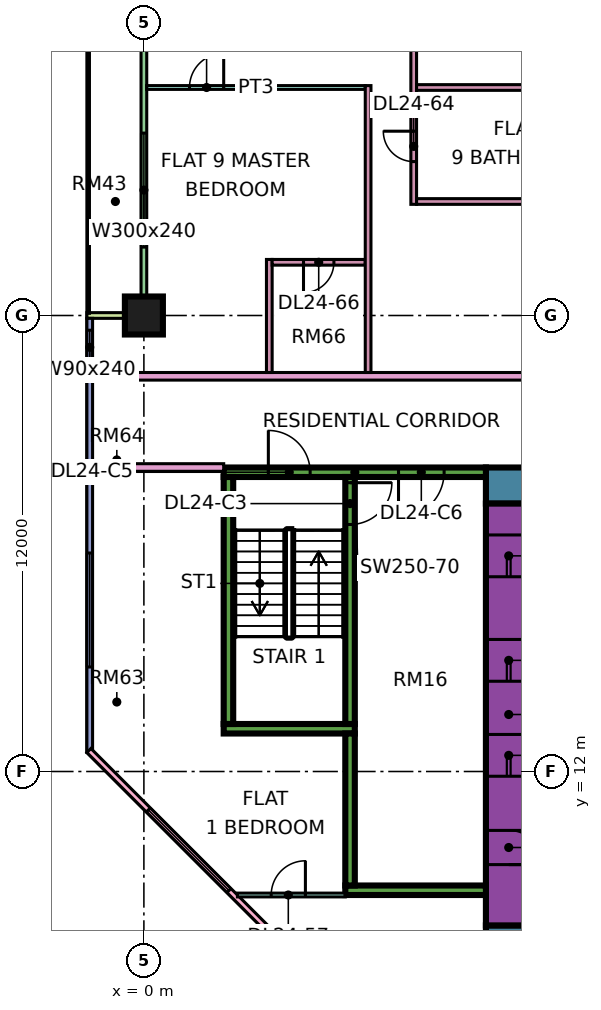
"""IFC4 building model, lengths in metres.
Left out: names, types, materials, properties, quantities, classifications, styles, units other than length and angle.
Written with IfcOpenShell. Run it as: python <this file> out.ifc"""

import sys

from ifc_helpers import new_model, si_unit, direction, frame, frame_2d, origin, origin_2d, place, context, subcontext, project, spatial, rectangle, extrude, element, fill, save


model = new_model("IFC4")
c1 = context("Model", 3, precision=1e-05, world=origin(), true_north=direction((0.0, 1.0)))
c2 = subcontext(c1, "Body", "Model", "MODEL_VIEW")
j1 = project(units=[si_unit("LENGTHUNIT", "METRE"), si_unit("PLANEANGLEUNIT", "RADIAN")], contexts=[c1])
p1 = place(None, origin())
s1 = spatial("IfcSite", under=j1, at=p1, CompositionType="ELEMENT")
p2 = place(p1, origin())
s2 = spatial("IfcBuilding", under=s1, at=p2, CompositionType="ELEMENT")
p3 = place(p2, frame((0.0, 0.0, 106.9)))
s3 = spatial("IfcBuildingStorey", under=s2, at=p3, CompositionType="ELEMENT", Elevation=106.9)
p4 = place(p3, frame((0.0, 24.0, 0.0), z_axis=(0.0, 0.0, 1.0), x_axis=(1.0, 0.0, 0.0)))
e1 = element("IfcColumn", 1, at=p4, inside=s3, PredefinedType="COLUMN", context=c2, shape_type="SweptSolid", body=[
    extrude(rectangle(XDim=1.0, YDim=1.0, at=origin_2d()), origin(), (0.0, 0.0, 1.0), 3.75),
])
p5 = place(p3, frame((9.0, 7.475, 0.0), z_axis=(0.0, 0.0, 1.0), x_axis=(1.0, 0.0, 0.0)))
e2 = element("IfcWall", 2, at=p5, inside=s3, PredefinedType="SHEAR", context=c2, shape_type="SweptSolid", body=[
    extrude(rectangle(XDim=25.0, YDim=0.95, at=frame_2d((12.5, 0.0))), origin(), (0.0, 0.0, 1.0), 3.75),
])
p6 = place(p3, frame((9.0, 19.525, 0.0), z_axis=(0.0, 0.0, 1.0), x_axis=(1.0, 0.0, 0.0)))
e3 = element("IfcWall", 3, at=p6, inside=s3, PredefinedType="SHEAR", context=c2, shape_type="SweptSolid", body=[
    extrude(rectangle(XDim=25.0, YDim=0.95, at=frame_2d((12.5, 0.0))), origin(), (0.0, 0.0, 1.0), 3.75),
])
p7 = place(p6, frame((19.1, 0.0, 0.0)))
e4 = element("IfcOpeningElement", 4, at=p7, cuts=e3, PredefinedType="OPENING", context=c2, shape_type="SweptSolid", body=[
    extrude(rectangle(XDim=1.8, YDim=2.4, at=frame_2d((0.9, 1.2))), frame((0.0, 0.485, 0.0), z_axis=(0.0, -1.0, 0.0), x_axis=(1.0, 0.0, 0.0)), (0.0, 0.0, 1.0), 0.97),
])
p8 = place(p3, frame((9.6, 7.95, 0.0), z_axis=(0.0, 0.0, 1.0), x_axis=(0.0, 1.0, 0.0)))
e5 = element("IfcWall", 5, at=p8, inside=s3, PredefinedType="SHEAR", context=c2, shape_type="SweptSolid", body=[
    extrude(rectangle(XDim=11.1, YDim=1.2, at=frame_2d((5.55, 0.0))), origin(), (0.0, 0.0, 1.0), 3.75),
])
p9 = place(p8, frame((3.925, 0.0, 0.0)))
e6 = element("IfcOpeningElement", 6, at=p9, cuts=e5, PredefinedType="OPENING", context=c2, shape_type="SweptSolid", body=[
    extrude(rectangle(XDim=1.1, YDim=2.2, at=frame_2d((0.55, 1.1))), frame((0.0, 0.61, 0.0), z_axis=(0.0, -1.0, 0.0), x_axis=(1.0, 0.0, 0.0)), (0.0, 0.0, 1.0), 1.22),
])
p10 = place(p8, frame((6.425, 0.0, 0.0)))
e7 = element("IfcOpeningElement", 7, at=p10, cuts=e5, PredefinedType="OPENING", context=c2, shape_type="SweptSolid", body=[
    extrude(rectangle(XDim=1.1, YDim=2.2, at=frame_2d((0.55, 1.1))), frame((0.0, 0.61, 0.0), z_axis=(0.0, -1.0, 0.0), x_axis=(1.0, 0.0, 0.0)), (0.0, 0.0, 1.0), 1.22),
])
p11 = place(p8, frame((9.175, 0.0, 0.0)))
e8 = element("IfcOpeningElement", 8, at=p11, cuts=e5, PredefinedType="OPENING", context=c2, shape_type="SweptSolid", body=[
    extrude(rectangle(XDim=1.1, YDim=2.2, at=frame_2d((0.55, 1.1))), frame((0.0, 0.61, 0.0), z_axis=(0.0, -1.0, 0.0), x_axis=(1.0, 0.0, 0.0)), (0.0, 0.0, 1.0), 1.22),
])
p12 = place(p8, frame((1.6, 0.0, 0.0)))
e9 = element("IfcOpeningElement", 9, at=p12, cuts=e5, PredefinedType="OPENING", context=c2, shape_type="SweptSolid", body=[
    extrude(rectangle(XDim=0.9, YDim=2.1, at=frame_2d((0.45, 1.05))), frame((0.0, 0.61, 0.0), z_axis=(0.0, -1.0, 0.0), x_axis=(1.0, 0.0, 0.0)), (0.0, 0.0, 1.0), 1.22),
])
p13 = place(p3, frame((2.1, 19.875, 0.0), z_axis=(0.0, 0.0, 1.0), x_axis=(1.0, 0.0, 0.0)))
e10 = element("IfcWall", 10, at=p13, inside=s3, PredefinedType="SHEAR", context=c2, shape_type="SweptSolid", body=[
    extrude(rectangle(XDim=6.9, YDim=0.25, at=frame_2d((3.45, 0.0))), origin(), (0.0, 0.0, 1.0), 3.75),
])
p14 = place(p13, frame((1.175, 0.0, 0.0)))
e11 = element("IfcOpeningElement", 11, at=p14, cuts=e10, PredefinedType="OPENING", context=c2, shape_type="SweptSolid", body=[
    extrude(rectangle(XDim=1.1, YDim=2.2, at=frame_2d((0.55, 1.1))), frame((0.0, 0.135, 0.0), z_axis=(0.0, -1.0, 0.0), x_axis=(1.0, 0.0, 0.0)), (0.0, 0.0, 1.0), 0.27),
])
p15 = place(p13, frame((4.6, 0.0, 0.0)))
e12 = element("IfcOpeningElement", 12, at=p15, cuts=e10, PredefinedType="OPENING", context=c2, shape_type="SweptSolid", body=[
    extrude(rectangle(XDim=1.2, YDim=2.2, at=frame_2d((0.6, 1.1))), frame((0.0, 0.135, 0.0), z_axis=(0.0, -1.0, 0.0), x_axis=(1.0, 0.0, 0.0)), (0.0, 0.0, 1.0), 0.27),
])
p16 = place(p3, frame((2.1, 13.125, 0.0), z_axis=(0.0, 0.0, 1.0), x_axis=(1.0, 0.0, 0.0)))
e13 = element("IfcWall", 13, at=p16, inside=s3, PredefinedType="SHEAR", context=c2, shape_type="SweptSolid", body=[
    extrude(rectangle(XDim=3.45, YDim=0.25, at=frame_2d((1.725, 0.0))), origin(), (0.0, 0.0, 1.0), 3.75),
])
p17 = place(p3, frame((2.225, 13.25, 0.0), z_axis=(0.0, 0.0, 1.0), x_axis=(0.0, 1.0, 0.0)))
e14 = element("IfcWall", 14, at=p17, inside=s3, PredefinedType="SHEAR", context=c2, shape_type="SweptSolid", body=[
    extrude(rectangle(XDim=6.5, YDim=0.25, at=frame_2d((3.25, 0.0))), origin(), (0.0, 0.0, 1.0), 3.75),
])
p18 = place(p3, frame((5.425, 13.25, 0.0), z_axis=(0.0, 0.0, 1.0), x_axis=(0.0, 1.0, 0.0)))
e15 = element("IfcWall", 15, at=p18, inside=s3, PredefinedType="SHEAR", context=c2, shape_type="SweptSolid", body=[
    extrude(rectangle(XDim=6.5, YDim=0.25, at=frame_2d((3.25, 0.0))), origin(), (0.0, 0.0, 1.0), 3.75),
])
p19 = place(p18, frame((5.25, 0.0, 0.0)))
e16 = element("IfcOpeningElement", 16, at=p19, cuts=e15, PredefinedType="OPENING", context=c2, shape_type="SweptSolid", body=[
    extrude(rectangle(XDim=1.1, YDim=2.2, at=frame_2d((0.55, 1.1))), frame((0.0, 0.135, 0.0), z_axis=(0.0, -1.0, 0.0), x_axis=(1.0, 0.0, 0.0)), (0.0, 0.0, 1.0), 0.27),
])
p20 = place(p3, frame((5.3, 8.875, 0.0), z_axis=(0.0, 0.0, 1.0), x_axis=(1.0, 0.0, 0.0)))
e17 = element("IfcWall", 17, at=p20, inside=s3, PredefinedType="SHEAR", context=c2, shape_type="SweptSolid", body=[
    extrude(rectangle(XDim=3.7, YDim=0.25, at=frame_2d((1.85, 0.0))), origin(), (0.0, 0.0, 1.0), 3.75),
])
p21 = place(p3, frame((5.425, 9.0, 0.0), z_axis=(0.0, 0.0, 1.0), x_axis=(0.0, 1.0, 0.0)))
e18 = element("IfcWall", 18, at=p21, inside=s3, PredefinedType="SHEAR", context=c2, shape_type="SweptSolid", body=[
    extrude(rectangle(XDim=4.0, YDim=0.25, at=frame_2d((2.0, 0.0))), origin(), (0.0, 0.0, 1.0), 3.75),
])
p22 = place(p3, frame((0.0, 35.925, 0.0), z_axis=(0.0, 0.0, 1.0), x_axis=(0.0, -1.0, 0.0)))
e19 = element("IfcWall", 19, at=p22, inside=s3, PredefinedType="SOLIDWALL", context=c2, shape_type="SweptSolid", body=[
    extrude(rectangle(XDim=11.85, YDim=0.15, at=frame_2d((5.925, 0.0))), origin(), (0.0, 0.0, 1.0), 3.35),
])
p23 = place(p22, frame((2.325, 0.0, 0.0)))
e20 = element("IfcOpeningElement", 20, at=p23, cuts=e19, PredefinedType="OPENING", context=c2, shape_type="SweptSolid", body=[
    extrude(rectangle(XDim=1.8, YDim=2.4, at=frame_2d((0.9, 1.2))), frame((0.0, 0.085, 0.0), z_axis=(0.0, -1.0, 0.0), x_axis=(1.0, 0.0, 0.0)), (0.0, 0.0, 1.0), 0.17),
])
p24 = place(p22, frame((7.125, 0.0, 0.45)))
e21 = element("IfcOpeningElement", 21, at=p24, cuts=e19, PredefinedType="OPENING", context=c2, shape_type="SweptSolid", body=[
    extrude(rectangle(XDim=3.0, YDim=2.4, at=frame_2d((1.5, 1.2))), frame((0.0, 0.085, 0.0), z_axis=(0.0, -1.0, 0.0), x_axis=(1.0, 0.0, 0.0)), (0.0, 0.0, 1.0), 0.17),
])
p25 = place(p3, frame((-1.5, 24.0, 0.0), z_axis=(0.0, 0.0, 1.0), x_axis=(1.0, 0.0, 0.0)))
e22 = element("IfcWall", 22, at=p25, inside=s3, PredefinedType="SOLIDWALL", context=c2, shape_type="SweptSolid", body=[
    extrude(rectangle(XDim=1.5, YDim=0.15, at=frame_2d((0.75, 0.0))), origin(), (0.0, 0.0, 1.0), 3.35),
])
p26 = place(p3, frame((-1.425, 23.925, 0.0), z_axis=(0.0, 0.0, 1.0), x_axis=(0.0, -1.0, 0.0)))
e23 = element("IfcWall", 23, at=p26, inside=s3, PredefinedType="SOLIDWALL", context=c2, shape_type="SweptSolid", body=[
    extrude(rectangle(XDim=11.425, YDim=0.15, at=frame_2d((5.712, 0.0))), origin(), (0.0, 0.0, 1.0), 3.35),
])
p27 = place(p26, frame((0.312, 0.0, 0.45)))
e24 = element("IfcOpeningElement", 24, at=p27, cuts=e23, PredefinedType="OPENING", context=c2, shape_type="SweptSolid", body=[
    extrude(rectangle(XDim=0.9, YDim=2.4, at=frame_2d((0.45, 1.2))), frame((0.0, 0.085, 0.0), z_axis=(0.0, -1.0, 0.0), x_axis=(1.0, 0.0, 0.0)), (0.0, 0.0, 1.0), 0.17),
])
p28 = place(p26, frame((6.175, 0.0, 0.45)))
e25 = element("IfcOpeningElement", 25, at=p28, cuts=e23, PredefinedType="OPENING", context=c2, shape_type="SweptSolid", body=[
    extrude(rectangle(XDim=3.0, YDim=2.4, at=frame_2d((1.5, 1.2))), frame((0.0, 0.085, 0.0), z_axis=(0.0, -1.0, 0.0), x_axis=(1.0, 0.0, 0.0)), (0.0, 0.0, 1.0), 0.17),
])
p29 = place(p3, frame((-1.447, 12.553, 0.0), z_axis=(0.0, 0.0, 1.0), x_axis=(0.707106781187, -0.707106781187, 0.0)))
e26 = element("IfcWall", 26, at=p29, inside=s3, PredefinedType="SOLIDWALL", context=c2, shape_type="SweptSolid", body=[
    extrude(rectangle(XDim=19.799, YDim=0.15, at=frame_2d((9.899, 0.0))), origin(), (0.0, 0.0, 1.0), 3.35),
])
p30 = place(p29, frame((2.212, 0.0, 0.45)))
e27 = element("IfcOpeningElement", 27, at=p30, cuts=e26, PredefinedType="OPENING", context=c2, shape_type="SweptSolid", body=[
    extrude(rectangle(XDim=3.0, YDim=2.4, at=frame_2d((1.5, 1.2))), frame((0.0, 0.085, 0.0), z_axis=(0.0, -1.0, 0.0), x_axis=(1.0, 0.0, 0.0)), (0.0, 0.0, 1.0), 0.17),
])
p31 = place(p29, frame((10.216, 0.0, 0.45)))
e28 = element("IfcOpeningElement", 28, at=p31, cuts=e26, PredefinedType="OPENING", context=c2, shape_type="SweptSolid", body=[
    extrude(rectangle(XDim=3.0, YDim=2.4, at=frame_2d((1.5, 1.2))), frame((0.0, 0.085, 0.0), z_axis=(0.0, -1.0, 0.0), x_axis=(1.0, 0.0, 0.0)), (0.0, 0.0, 1.0), 0.17),
])
p32 = place(p3, frame((-1.35, 20.0, 0.0), z_axis=(0.0, 0.0, 1.0), x_axis=(1.0, 0.0, 0.0)))
e29 = element("IfcWall", 29, at=p32, inside=s3, PredefinedType="PARTITIONING", context=c2, shape_type="SweptSolid", body=[
    extrude(rectangle(XDim=3.45, YDim=0.2, at=frame_2d((1.725, 0.0))), origin(), (0.0, 0.0, 1.0), 3.35),
])
p33 = place(p3, frame((-1.35, 22.4, 0.0), z_axis=(0.0, 0.0, 1.0), x_axis=(1.0, 0.0, 0.0)))
e30 = element("IfcWall", 30, at=p33, inside=s3, PredefinedType="PARTITIONING", context=c2, shape_type="SweptSolid", body=[
    extrude(rectangle(XDim=13.75, YDim=0.2, at=frame_2d((6.875, 0.0))), origin(), (0.0, 0.0, 1.0), 3.35),
])
p34 = place(p3, frame((0.074, 30.0, 0.0), z_axis=(0.0, 0.0, 1.0), x_axis=(1.0, 0.0, 0.0)))
e31 = element("IfcWall", 31, at=p34, inside=s3, PredefinedType="PARTITIONING", context=c2, shape_type="SweptSolid", body=[
    extrude(rectangle(XDim=5.751, YDim=0.1, at=frame_2d((2.875, 0.0))), origin(), (0.0, 0.0, 1.0), 3.35),
])
p35 = place(p34, frame((1.126, 0.0, 0.0)))
e32 = element("IfcOpeningElement", 32, at=p35, cuts=e31, PredefinedType="OPENING", context=c2, shape_type="SweptSolid", body=[
    extrude(rectangle(XDim=0.9, YDim=2.1, at=frame_2d((0.45, 1.05))), frame((0.0, 0.06, 0.0), z_axis=(0.0, -1.0, 0.0), x_axis=(1.0, 0.0, 0.0)), (0.0, 0.0, 1.0), 0.12),
])
p36 = place(p3, frame((2.461, 8.75, 0.0), z_axis=(0.0, 0.0, 1.0), x_axis=(1.0, 0.0, 0.0)))
e33 = element("IfcWall", 33, at=p36, inside=s3, PredefinedType="PARTITIONING", context=c2, shape_type="SweptSolid", body=[
    extrude(rectangle(XDim=2.839, YDim=0.1, at=frame_2d((1.419, 0.0))), origin(), (0.0, 0.0, 1.0), 3.35),
])
p37 = place(p36, frame((0.889, 0.0, 0.0)))
e34 = element("IfcOpeningElement", 34, at=p37, cuts=e33, PredefinedType="OPENING", context=c2, shape_type="SweptSolid", body=[
    extrude(rectangle(XDim=0.9, YDim=2.1, at=frame_2d((0.45, 1.05))), frame((0.0, 0.06, 0.0), z_axis=(0.0, -1.0, 0.0), x_axis=(1.0, 0.0, 0.0)), (0.0, 0.0, 1.0), 0.12),
])
p38 = place(p3, frame((3.3, 22.5, 0.0), z_axis=(0.0, 0.0, 1.0), x_axis=(0.0, 1.0, 0.0)))
e35 = element("IfcWall", 35, at=p38, inside=s3, PredefinedType="PARTITIONING", context=c2, shape_type="SweptSolid", body=[
    extrude(rectangle(XDim=2.975, YDim=0.15, at=frame_2d((1.488, 0.0))), origin(), (0.0, 0.0, 1.0), 3.35),
])
p39 = place(p3, frame((3.375, 25.4, 0.0), z_axis=(0.0, 0.0, 1.0), x_axis=(1.0, 0.0, 0.0)))
e36 = element("IfcWall", 36, at=p39, inside=s3, PredefinedType="PARTITIONING", context=c2, shape_type="SweptSolid", body=[
    extrude(rectangle(XDim=2.45, YDim=0.15, at=frame_2d((1.225, 0.0))), origin(), (0.0, 0.0, 1.0), 3.35),
])
p40 = place(p39, frame((0.825, 0.0, 0.0)))
e37 = element("IfcOpeningElement", 37, at=p40, cuts=e36, PredefinedType="OPENING", context=c2, shape_type="SweptSolid", body=[
    extrude(rectangle(XDim=0.8, YDim=2.1, at=frame_2d((0.4, 1.05))), frame((0.0, 0.085, 0.0), z_axis=(0.0, -1.0, 0.0), x_axis=(1.0, 0.0, 0.0)), (0.0, 0.0, 1.0), 0.17),
])
p41 = place(p3, frame((5.9, 22.5, 0.0), z_axis=(0.0, 0.0, 1.0), x_axis=(0.0, 1.0, 0.0)))
e38 = element("IfcWall", 38, at=p41, inside=s3, PredefinedType="PARTITIONING", context=c2, shape_type="SweptSolid", body=[
    extrude(rectangle(XDim=7.55, YDim=0.15, at=frame_2d((3.775, 0.0))), origin(), (0.0, 0.0, 1.0), 3.35),
])
p42 = place(p3, frame((7.1, 26.925, 0.0), z_axis=(0.0, 0.0, 1.0), x_axis=(0.0, 1.0, 0.0)))
e39 = element("IfcWall", 39, at=p42, inside=s3, PredefinedType="PARTITIONING", context=c2, shape_type="SweptSolid", body=[
    extrude(rectangle(XDim=8.975, YDim=0.15, at=frame_2d((4.487, 0.0))), origin(), (0.0, 0.0, 1.0), 3.35),
])
p43 = place(p42, frame((1.125, 0.0, 0.0)))
e40 = element("IfcOpeningElement", 40, at=p43, cuts=e39, PredefinedType="OPENING", context=c2, shape_type="SweptSolid", body=[
    extrude(rectangle(XDim=0.8, YDim=2.1, at=frame_2d((0.4, 1.05))), frame((0.0, 0.085, 0.0), z_axis=(0.0, -1.0, 0.0), x_axis=(1.0, 0.0, 0.0)), (0.0, 0.0, 1.0), 0.17),
])
p44 = place(p42, frame((5.625, 0.0, 0.0)))
e41 = element("IfcOpeningElement", 41, at=p44, cuts=e39, PredefinedType="OPENING", context=c2, shape_type="SweptSolid", body=[
    extrude(rectangle(XDim=0.9, YDim=2.1, at=frame_2d((0.45, 1.05))), frame((0.0, 0.085, 0.0), z_axis=(0.0, -1.0, 0.0), x_axis=(1.0, 0.0, 0.0)), (0.0, 0.0, 1.0), 0.17),
])
for number, where, z_axis, x_axis in (
    (42, (7.175, 27.0, 0.0), (0.0, 0.0, 1.0), (1.0, 0.0, 0.0)),
    (43, (7.175, 30.0, 0.0), (0.0, 0.0, 1.0), (1.0, 0.0, 0.0)),
):
    element("IfcWall", number, at=place(p3, frame(where, z_axis=z_axis, x_axis=x_axis)), inside=s3, PredefinedType="PARTITIONING", context=c2, shape_type="SweptSolid", body=[
        extrude(rectangle(XDim=5.225, YDim=0.15, at=frame_2d((2.612, 0.0))), origin(), (0.0, 0.0, 1.0), 3.35),
    ])
p45 = place(p24, origin())
e44 = element("IfcWindow", 44, at=p45, inside=s3, PartitioningType="SINGLE_PANEL", PredefinedType="WINDOW", context=c2, shape_type="SweptSolid", body=[
    extrude(rectangle(XDim=3.0, YDim=2.4, at=frame_2d((1.5, 1.2))), frame((0.0, 0.03, 0.0), z_axis=(0.0, -1.0, 0.0), x_axis=(1.0, 0.0, 0.0)), (0.0, 0.0, 1.0), 0.06),
])
fill(e21, e44)
p46 = place(p27, origin())
e45 = element("IfcWindow", 45, at=p46, inside=s3, PartitioningType="SINGLE_PANEL", PredefinedType="WINDOW", context=c2, shape_type="SweptSolid", body=[
    extrude(rectangle(XDim=0.9, YDim=2.4, at=frame_2d((0.45, 1.2))), frame((0.0, 0.03, 0.0), z_axis=(0.0, -1.0, 0.0), x_axis=(1.0, 0.0, 0.0)), (0.0, 0.0, 1.0), 0.06),
])
fill(e24, e45)
p47 = place(p28, origin())
e46 = element("IfcWindow", 46, at=p47, inside=s3, PartitioningType="SINGLE_PANEL", PredefinedType="WINDOW", context=c2, shape_type="SweptSolid", body=[
    extrude(rectangle(XDim=3.0, YDim=2.4, at=frame_2d((1.5, 1.2))), frame((0.0, 0.03, 0.0), z_axis=(0.0, -1.0, 0.0), x_axis=(1.0, 0.0, 0.0)), (0.0, 0.0, 1.0), 0.06),
])
fill(e25, e46)
p48 = place(p30, origin())
e47 = element("IfcWindow", 47, at=p48, inside=s3, PartitioningType="SINGLE_PANEL", PredefinedType="WINDOW", context=c2, shape_type="SweptSolid", body=[
    extrude(rectangle(XDim=3.0, YDim=2.4, at=frame_2d((1.5, 1.2))), frame((0.0, 0.03, 0.0), z_axis=(0.0, -1.0, 0.0), x_axis=(1.0, 0.0, 0.0)), (0.0, 0.0, 1.0), 0.06),
])
fill(e27, e47)
p49 = place(p9, origin())
e48 = element("IfcDoor", 48, at=p49, inside=s3, OperationType="DOUBLE_DOOR_SLIDING", PredefinedType="DOOR", context=c2, shape_type="SweptSolid", body=[
    extrude(rectangle(XDim=1.1, YDim=2.2, at=frame_2d((0.55, 1.1))), frame((0.0, 0.025, 0.0), z_axis=(0.0, -1.0, 0.0), x_axis=(1.0, 0.0, 0.0)), (0.0, 0.0, 1.0), 0.05),
])
fill(e6, e48)
p50 = place(p10, origin())
e49 = element("IfcDoor", 49, at=p50, inside=s3, OperationType="DOUBLE_DOOR_SLIDING", PredefinedType="DOOR", context=c2, shape_type="SweptSolid", body=[
    extrude(rectangle(XDim=1.1, YDim=2.2, at=frame_2d((0.55, 1.1))), frame((0.0, 0.025, 0.0), z_axis=(0.0, -1.0, 0.0), x_axis=(1.0, 0.0, 0.0)), (0.0, 0.0, 1.0), 0.05),
])
fill(e7, e49)
p51 = place(p11, origin())
e50 = element("IfcDoor", 50, at=p51, inside=s3, OperationType="DOUBLE_DOOR_SLIDING", PredefinedType="DOOR", context=c2, shape_type="SweptSolid", body=[
    extrude(rectangle(XDim=1.1, YDim=2.2, at=frame_2d((0.55, 1.1))), frame((0.0, 0.025, 0.0), z_axis=(0.0, -1.0, 0.0), x_axis=(1.0, 0.0, 0.0)), (0.0, 0.0, 1.0), 0.05),
])
fill(e8, e50)
p52 = place(p19, origin())
e51 = element("IfcDoor", 51, at=p52, inside=s3, OperationType="SINGLE_SWING_RIGHT", PredefinedType="DOOR", context=c2, shape_type="SweptSolid", body=[
    extrude(rectangle(XDim=1.1, YDim=2.2, at=frame_2d((0.55, 1.1))), frame((0.0, 0.025, 0.0), z_axis=(0.0, -1.0, 0.0), x_axis=(1.0, 0.0, 0.0)), (0.0, 0.0, 1.0), 0.05),
])
fill(e16, e51)
p53 = place(p12, frame((0.9, 0.0, 0.0), z_axis=(0.0, 0.0, 1.0), x_axis=(-1.0, 0.0, 0.0)))
e52 = element("IfcDoor", 52, at=p53, inside=s3, OperationType="SINGLE_SWING_LEFT", PredefinedType="DOOR", context=c2, shape_type="SweptSolid", body=[
    extrude(rectangle(XDim=0.9, YDim=2.1, at=frame_2d((0.45, 1.05))), frame((0.0, 0.025, 0.0), z_axis=(0.0, -1.0, 0.0), x_axis=(1.0, 0.0, 0.0)), (0.0, 0.0, 1.0), 0.05),
])
fill(e9, e52)
p54 = place(p14, origin())
e53 = element("IfcDoor", 53, at=p54, inside=s3, OperationType="SINGLE_SWING_LEFT", PredefinedType="DOOR", context=c2, shape_type="SweptSolid", body=[
    extrude(rectangle(XDim=1.1, YDim=2.2, at=frame_2d((0.55, 1.1))), frame((0.0, 0.025, 0.0), z_axis=(0.0, -1.0, 0.0), x_axis=(1.0, 0.0, 0.0)), (0.0, 0.0, 1.0), 0.05),
])
fill(e11, e53)
p55 = place(p15, frame((1.2, 0.0, 0.0), z_axis=(0.0, 0.0, 1.0), x_axis=(-1.0, 0.0, 0.0)))
e54 = element("IfcDoor", 54, at=p55, inside=s3, OperationType="SINGLE_SWING_LEFT", PredefinedType="DOOR", context=c2, shape_type="SweptSolid", body=[
    extrude(rectangle(XDim=1.2, YDim=2.2, at=frame_2d((0.6, 1.1))), frame((0.0, 0.025, 0.0), z_axis=(0.0, -1.0, 0.0), x_axis=(1.0, 0.0, 0.0)), (0.0, 0.0, 1.0), 0.05),
])
fill(e12, e54)
p56 = place(p37, frame((0.9, 0.0, 0.0), z_axis=(0.0, 0.0, 1.0), x_axis=(-1.0, 0.0, 0.0)))
e55 = element("IfcDoor", 55, at=p56, inside=s3, OperationType="SINGLE_SWING_RIGHT", PredefinedType="DOOR", context=c2, shape_type="SweptSolid", body=[
    extrude(rectangle(XDim=0.9, YDim=2.1, at=frame_2d((0.45, 1.05))), frame((0.0, 0.025, 0.0), z_axis=(0.0, -1.0, 0.0), x_axis=(1.0, 0.0, 0.0)), (0.0, 0.0, 1.0), 0.05),
])
fill(e34, e55)
p57 = place(p43, frame((0.8, 0.0, 0.0), z_axis=(0.0, 0.0, 1.0), x_axis=(-1.0, 0.0, 0.0)))
e56 = element("IfcDoor", 56, at=p57, inside=s3, OperationType="SINGLE_SWING_RIGHT", PredefinedType="DOOR", context=c2, shape_type="SweptSolid", body=[
    extrude(rectangle(XDim=0.8, YDim=2.1, at=frame_2d((0.4, 1.05))), frame((0.0, 0.025, 0.0), z_axis=(0.0, -1.0, 0.0), x_axis=(1.0, 0.0, 0.0)), (0.0, 0.0, 1.0), 0.05),
])
fill(e40, e56)
p58 = place(p35, frame((0.9, 0.0, 0.0), z_axis=(0.0, 0.0, 1.0), x_axis=(-1.0, 0.0, 0.0)))
e57 = element("IfcDoor", 57, at=p58, inside=s3, OperationType="SINGLE_SWING_RIGHT", PredefinedType="DOOR", context=c2, shape_type="SweptSolid", body=[
    extrude(rectangle(XDim=0.9, YDim=2.1, at=frame_2d((0.45, 1.05))), frame((0.0, 0.025, 0.0), z_axis=(0.0, -1.0, 0.0), x_axis=(1.0, 0.0, 0.0)), (0.0, 0.0, 1.0), 0.05),
])
fill(e32, e57)
p59 = place(p40, frame((0.8, 0.0, 0.0), z_axis=(0.0, 0.0, 1.0), x_axis=(-1.0, 0.0, 0.0)))
e58 = element("IfcDoor", 58, at=p59, inside=s3, OperationType="SINGLE_SWING_LEFT", PredefinedType="DOOR", context=c2, shape_type="SweptSolid", body=[
    extrude(rectangle(XDim=0.8, YDim=2.1, at=frame_2d((0.4, 1.05))), frame((0.0, 0.025, 0.0), z_axis=(0.0, -1.0, 0.0), x_axis=(1.0, 0.0, 0.0)), (0.0, 0.0, 1.0), 0.05),
])
fill(e37, e58)
save(model, sys.argv[1])
